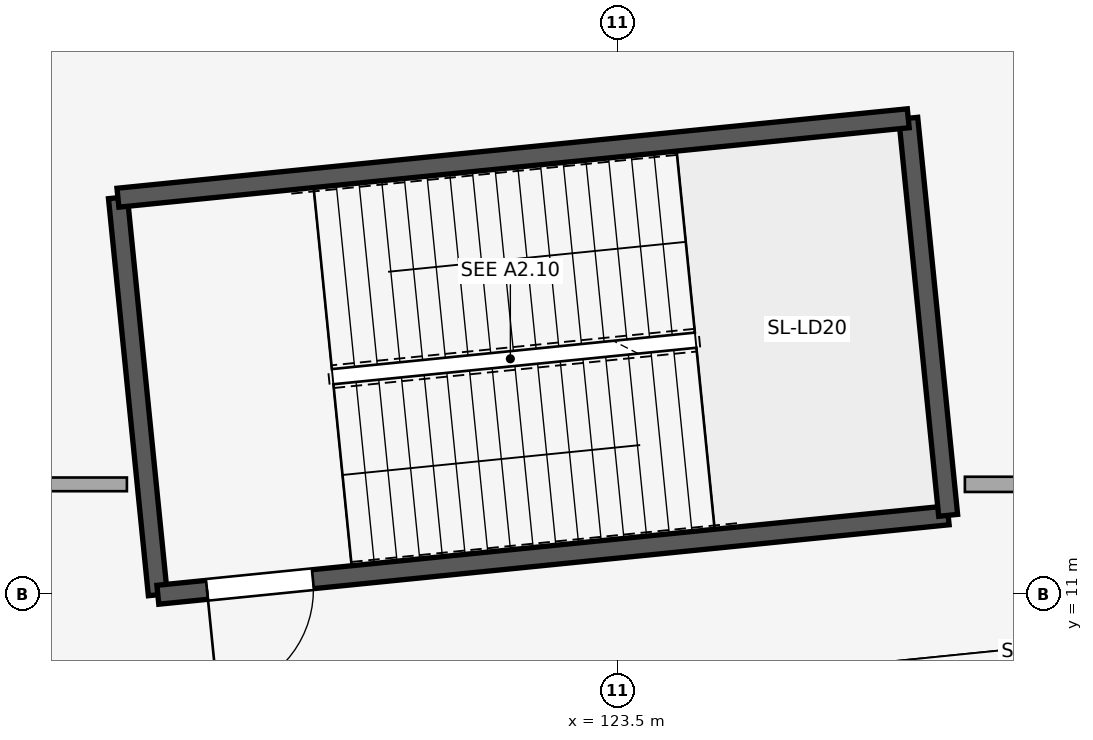
"""IFC4 building model, lengths in metres.
Left out: names, types, materials, properties, quantities, classifications, styles, units other than length and angle.
Written with IfcOpenShell. Run it as: python <this file> out.ifc"""

import sys

from ifc_helpers import new_model, si_unit, direction, frame, frame_2d, origin, place, context, subcontext, project, spatial, rectangle, extrude, element, fill, save


model = new_model("IFC4")
c1 = context("Model", 3, precision=1e-05, world=origin(), true_north=direction((0.0, 1.0)))
c2 = subcontext(c1, "Body", "Model", "MODEL_VIEW")
j1 = project(units=[si_unit("LENGTHUNIT", "METRE"), si_unit("PLANEANGLEUNIT", "RADIAN")], contexts=[c1])
p1 = place(None, origin())
s1 = spatial("IfcSite", under=j1, at=p1, CompositionType="ELEMENT")
p2 = place(p1, origin())
s2 = spatial("IfcBuilding", under=s1, at=p2, CompositionType="ELEMENT")
p3 = place(p2, origin())
s3 = spatial("IfcBuildingStorey", under=s2, at=p3, CompositionType="ELEMENT", Elevation=0.0)
p4 = place(p3, frame((116.921, 16.221, 0.0), z_axis=(0.0, 0.0, 1.0), x_axis=(0.100028593886, -0.994984562898, 0.0)))
e1 = element("IfcWall", 1, at=p4, inside=s3, PredefinedType="SHEAR", context=c2, shape_type="SweptSolid", body=[
    extrude(rectangle(XDim=5.25, YDim=0.25, at=frame_2d((2.625, 0.0))), origin(), (0.0, 0.0, 1.0), 4.94),
])
p5 = place(p3, frame((117.447, 10.997, 0.0), z_axis=(0.0, 0.0, 1.0), x_axis=(0.994985938948, 0.100014905366, 0.0)))
e2 = element("IfcWall", 2, at=p5, inside=s3, PredefinedType="SHEAR", context=c2, shape_type="SweptSolid", body=[
    extrude(rectangle(XDim=10.45, YDim=0.25, at=frame_2d((5.225, 0.0))), origin(), (0.0, 0.0, 1.0), 4.94),
])
p6 = place(p5, frame((0.65, 0.0, 0.0)))
e3 = element("IfcOpeningElement", 3, at=p6, cuts=e2, PredefinedType="OPENING", context=c2, shape_type="SweptSolid", body=[
    extrude(rectangle(XDim=1.4, YDim=2.2, at=frame_2d((0.7, 1.1))), frame((0.0, 0.135, 0.0), z_axis=(0.0, -1.0, 0.0), x_axis=(1.0, 0.0, 0.0)), (0.0, 0.0, 1.0), 0.27),
])
p7 = place(p3, frame((127.844, 12.042, 0.0), z_axis=(0.0, 0.0, 1.0), x_axis=(-0.100028593886, 0.994984562898, 0.0)))
e4 = element("IfcWall", 4, at=p7, inside=s3, PredefinedType="SHEAR", context=c2, shape_type="SweptSolid", body=[
    extrude(rectangle(XDim=5.25, YDim=0.25, at=frame_2d((2.625, 0.0))), origin(), (0.0, 0.0, 1.0), 4.94),
])
p8 = place(p3, frame((127.319, 17.266, 0.0), z_axis=(0.0, 0.0, 1.0), x_axis=(-0.994985938948, -0.100014905366, 0.0)))
e5 = element("IfcWall", 5, at=p8, inside=s3, PredefinedType="SHEAR", context=c2, shape_type="SweptSolid", body=[
    extrude(rectangle(XDim=10.45, YDim=0.25, at=frame_2d((5.225, 0.0))), origin(), (0.0, 0.0, 1.0), 4.94),
])
p9 = place(p3, frame((104.96, 12.45, 0.0), z_axis=(0.0, 0.0, 1.0), x_axis=(1.0, 0.0, 0.0)))
e6 = element("IfcWall", 6, at=p9, inside=s3, PredefinedType="PARTITIONING", context=c2, shape_type="SweptSolid", body=[
    extrude(rectangle(XDim=12.079, YDim=0.18, at=frame_2d((6.04, 0.0))), origin(), (0.0, 0.0, 1.0), 3.69),
])
p10 = place(p9, frame((8.729, 0.0, 0.0)))
e7 = element("IfcOpeningElement", 7, at=p10, cuts=e6, PredefinedType="OPENING", context=c2, shape_type="SweptSolid", body=[
    extrude(rectangle(XDim=1.56, YDim=2.38, at=frame_2d((0.78, 1.19))), frame((0.0, 0.1, 0.0), z_axis=(0.0, -1.0, 0.0), x_axis=(1.0, 0.0, 0.0)), (0.0, 0.0, 1.0), 0.2),
])
p11 = place(p3, frame((128.064, 12.45, 0.0), z_axis=(0.0, 0.0, 1.0), x_axis=(1.0, 0.0, 0.0)))
e8 = element("IfcWall", 8, at=p11, inside=s3, PredefinedType="PARTITIONING", context=c2, shape_type="SweptSolid", body=[
    extrude(rectangle(XDim=19.351, YDim=0.2, at=frame_2d((9.675, 0.0))), origin(), (0.0, 0.0, 1.0), 3.69),
])
p12 = place(p11, frame((16.001, 0.0, 0.0)))
e9 = element("IfcOpeningElement", 9, at=p12, cuts=e8, PredefinedType="OPENING", context=c2, shape_type="SweptSolid", body=[
    extrude(rectangle(XDim=1.68, YDim=2.1, at=frame_2d((0.84, 1.05))), frame((0.0, 0.11, 0.0), z_axis=(0.0, -1.0, 0.0), x_axis=(1.0, 0.0, 0.0)), (0.0, 0.0, 1.0), 0.22),
])
p13 = place(p6, frame((1.4, 0.0, 0.0), z_axis=(0.0, 0.0, 1.0), x_axis=(-1.0, 0.0, 0.0)))
e10 = element("IfcDoor", 10, at=p13, inside=s3, OperationType="SINGLE_SWING_RIGHT", PredefinedType="DOOR", context=c2, shape_type="SweptSolid", body=[
    extrude(rectangle(XDim=1.4, YDim=2.2, at=frame_2d((0.7, 1.1))), frame((0.0, 0.025, 0.0), z_axis=(0.0, -1.0, 0.0), x_axis=(1.0, 0.0, 0.0)), (0.0, 0.0, 1.0), 0.05),
])
fill(e3, e10)
save(model, sys.argv[1])
